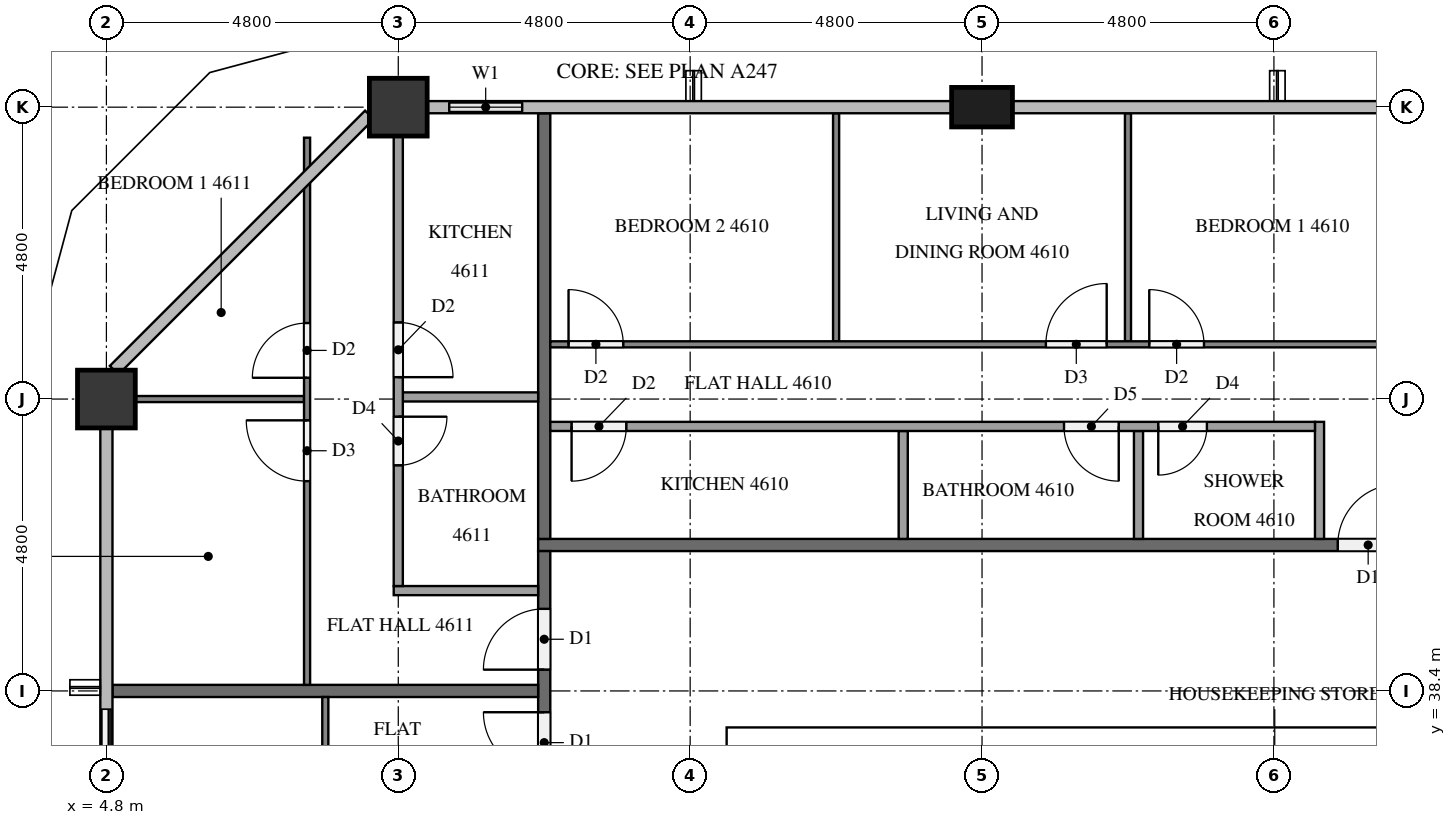
"""IFC4 building model, lengths in metres.
Left out: names, types, materials, properties, quantities, classifications, styles, units other than length and angle.
Written with IfcOpenShell. Run it as: python <this file> out.ifc"""

import sys

from ifc_helpers import new_model, si_unit, direction, frame, frame_2d, origin, origin_2d, place, context, subcontext, project, spatial, rectangle, extrude, element, fill, save


model = new_model("IFC4")
c1 = context("Model", 3, precision=1e-05, world=origin(), true_north=direction((0.0, 1.0)))
c2 = subcontext(c1, "Body", "Model", "MODEL_VIEW")
j1 = project(units=[si_unit("LENGTHUNIT", "METRE"), si_unit("PLANEANGLEUNIT", "RADIAN")], contexts=[c1])
p1 = place(None, origin())
s1 = spatial("IfcSite", under=j1, at=p1, CompositionType="ELEMENT")
p2 = place(p1, origin())
s2 = spatial("IfcBuilding", under=s1, at=p2, CompositionType="ELEMENT")
p3 = place(p2, frame((0.0, 0.0, 178.9)))
s3 = spatial("IfcBuildingStorey", under=s2, at=p3, CompositionType="ELEMENT", Elevation=178.9)
p4 = place(p3, frame((15.0, 37.45, 0.0), z_axis=(0.0, 0.0, 1.0), x_axis=(1.0, 0.0, 0.0)))
e1 = element("IfcWall", 1, at=p4, inside=s3, PredefinedType="SHEAR", context=c2, shape_type="SweptSolid", body=[
    extrude(rectangle(XDim=32.4, YDim=0.7, at=frame_2d((16.2, 0.0))), origin(), (0.0, 0.0, 1.0), 3.2),
])
p5 = place(p4, frame((15.3, 0.0, 0.0)))
e2 = element("IfcOpeningElement", 2, at=p5, cuts=e1, PredefinedType="OPENING", context=c2, shape_type="SweptSolid", body=[
    extrude(rectangle(XDim=1.8, YDim=2.1, at=frame_2d((0.9, 1.05))), frame((0.0, 0.36, 0.0), z_axis=(0.0, -1.0, 0.0), x_axis=(1.0, 0.0, 0.0)), (0.0, 0.0, 1.0), 0.72),
])
p6 = place(p4, frame((1.544, 0.0, 0.0)))
e3 = element("IfcOpeningElement", 3, at=p6, cuts=e1, PredefinedType="OPENING", context=c2, shape_type="SweptSolid", body=[
    extrude(rectangle(XDim=1.0, YDim=2.1, at=frame_2d((0.5, 1.05))), frame((0.0, 0.36, 0.0), z_axis=(0.0, -1.0, 0.0), x_axis=(1.0, 0.0, 0.0)), (0.0, 0.0, 1.0), 0.72),
])
p7 = place(p4, frame((5.219, 0.0, 0.0)))
e4 = element("IfcOpeningElement", 4, at=p7, cuts=e1, PredefinedType="OPENING", context=c2, shape_type="SweptSolid", body=[
    extrude(rectangle(XDim=1.0, YDim=2.1, at=frame_2d((0.5, 1.05))), frame((0.0, 0.36, 0.0), z_axis=(0.0, -1.0, 0.0), x_axis=(1.0, 0.0, 0.0)), (0.0, 0.0, 1.0), 0.72),
])
p8 = place(p3, frame((19.2, 48.0, 0.0), z_axis=(0.0, 0.0, 1.0), x_axis=(1.0, 0.0, 0.0)))
e5 = element("IfcColumn", 5, at=p8, inside=s3, PredefinedType="COLUMN", context=c2, shape_type="SweptSolid", body=[
    extrude(rectangle(XDim=1.0, YDim=0.65, at=origin_2d()), origin(), (0.0, 0.0, 1.0), 3.2),
])
for number, where, z_axis, x_axis in (
    (6, (9.6, 48.0, 0.0), (0.0, 0.0, 1.0), (1.0, 0.0, 0.0)),
    (7, (4.8, 43.2, 0.0), (0.0, 0.0, 1.0), (1.0, 0.0, 0.0)),
):
    element("IfcColumn", number, at=place(p3, frame(where, z_axis=z_axis, x_axis=x_axis)), inside=s3, PredefinedType="COLUMN", context=c2, shape_type="SweptSolid", body=[
        extrude(rectangle(XDim=0.95, YDim=0.95, at=origin_2d()), origin(), (0.0, 0.0, 1.0), 3.2),
    ])
p9 = place(p3, frame((12.0, 48.0, 0.0), z_axis=(0.0, 0.0, 1.0), x_axis=(-1.0, 0.0, 0.0)))
e8 = element("IfcWall", 8, at=p9, inside=s3, PredefinedType="SOLIDWALL", context=c2, shape_type="SweptSolid", body=[
    extrude(rectangle(XDim=1.925, YDim=0.15, at=frame_2d((0.962, 0.0))), origin(), (0.0, 0.0, 1.0), 3.2),
])
p10 = place(p9, frame((0.363, 0.0, 0.9)))
e9 = element("IfcOpeningElement", 9, at=p10, cuts=e8, PredefinedType="OPENING", context=c2, shape_type="SweptSolid", body=[
    extrude(rectangle(XDim=1.2, YDim=1.4, at=frame_2d((0.6, 0.7))), frame((0.0, 0.085, 0.0), z_axis=(0.0, -1.0, 0.0), x_axis=(1.0, 0.0, 0.0)), (0.0, 0.0, 1.0), 0.17),
])
p11 = place(p3, frame((4.8, 38.4, 0.0), z_axis=(0.0, 0.0, 1.0), x_axis=(0.0, -1.0, 0.0)))
e10 = element("IfcWall", 10, at=p11, inside=s3, PredefinedType="SOLIDWALL", context=c2, shape_type="SweptSolid", body=[
    extrude(rectangle(XDim=2.4, YDim=0.15, at=frame_2d((1.2, 0.0))), origin(), (0.0, 0.0, 1.0), 3.2),
])
p12 = place(p11, frame((0.3, 0.0, 0.0)))
e11 = element("IfcOpeningElement", 11, at=p12, cuts=e10, PredefinedType="OPENING", context=c2, shape_type="SweptSolid", body=[
    extrude(rectangle(XDim=1.8, YDim=2.4, at=frame_2d((0.9, 1.2))), frame((0.0, 0.085, 0.0), z_axis=(0.0, -1.0, 0.0), x_axis=(1.0, 0.0, 0.0)), (0.0, 0.0, 1.0), 0.17),
])
p13 = place(p3, frame((11.9, 40.8, 0.0), z_axis=(0.0, 0.0, 1.0), x_axis=(1.0, 0.0, 0.0)))
e12 = element("IfcWall", 12, at=p13, inside=s3, PredefinedType="PARTITIONING", context=c2, shape_type="SweptSolid", body=[
    extrude(rectangle(XDim=38.6, YDim=0.2, at=frame_2d((19.3, 0.0))), origin(), (0.0, 0.0, 1.0), 3.2),
])
p14 = place(p13, frame((37.15, 0.0, 0.0)))
e13 = element("IfcOpeningElement", 13, at=p14, cuts=e12, PredefinedType="OPENING", context=c2, shape_type="SweptSolid", body=[
    extrude(rectangle(XDim=1.0, YDim=2.1, at=frame_2d((0.5, 1.05))), frame((0.0, 0.11, 0.0), z_axis=(0.0, -1.0, 0.0), x_axis=(1.0, 0.0, 0.0)), (0.0, 0.0, 1.0), 0.22),
])
p15 = place(p13, frame((20.35, 0.0, 0.0)))
e14 = element("IfcOpeningElement", 14, at=p15, cuts=e12, PredefinedType="OPENING", context=c2, shape_type="SweptSolid", body=[
    extrude(rectangle(XDim=1.0, YDim=2.1, at=frame_2d((0.5, 1.05))), frame((0.0, 0.11, 0.0), z_axis=(0.0, -1.0, 0.0), x_axis=(1.0, 0.0, 0.0)), (0.0, 0.0, 1.0), 0.22),
])
p16 = place(p13, frame((13.15, 0.0, 0.0)))
e15 = element("IfcOpeningElement", 15, at=p16, cuts=e12, PredefinedType="OPENING", context=c2, shape_type="SweptSolid", body=[
    extrude(rectangle(XDim=1.0, YDim=2.1, at=frame_2d((0.5, 1.05))), frame((0.0, 0.11, 0.0), z_axis=(0.0, -1.0, 0.0), x_axis=(1.0, 0.0, 0.0)), (0.0, 0.0, 1.0), 0.22),
])
p17 = place(p3, frame((12.0, 12.1, 0.0), z_axis=(0.0, 0.0, 1.0), x_axis=(0.0, 1.0, 0.0)))
e16 = element("IfcWall", 16, at=p17, inside=s3, PredefinedType="PARTITIONING", context=c2, shape_type="SweptSolid", body=[
    extrude(rectangle(XDim=28.6, YDim=0.2, at=frame_2d((14.3, 0.0))), origin(), (0.0, 0.0, 1.0), 3.2),
])
p18 = place(p17, frame((26.65, 0.0, 0.0)))
e17 = element("IfcOpeningElement", 17, at=p18, cuts=e16, PredefinedType="OPENING", context=c2, shape_type="SweptSolid", body=[
    extrude(rectangle(XDim=1.0, YDim=2.1, at=frame_2d((0.5, 1.05))), frame((0.0, 0.11, 0.0), z_axis=(0.0, -1.0, 0.0), x_axis=(1.0, 0.0, 0.0)), (0.0, 0.0, 1.0), 0.22),
])
p19 = place(p17, frame((24.95, 0.0, 0.0)))
e18 = element("IfcOpeningElement", 18, at=p19, cuts=e16, PredefinedType="OPENING", context=c2, shape_type="SweptSolid", body=[
    extrude(rectangle(XDim=1.0, YDim=2.1, at=frame_2d((0.5, 1.05))), frame((0.0, 0.11, 0.0), z_axis=(0.0, -1.0, 0.0), x_axis=(1.0, 0.0, 0.0)), (0.0, 0.0, 1.0), 0.22),
])
p20 = place(p17, frame((12.95, 0.0, 0.0)))
e19 = element("IfcOpeningElement", 19, at=p20, cuts=e16, PredefinedType="OPENING", context=c2, shape_type="SweptSolid", body=[
    extrude(rectangle(XDim=1.0, YDim=2.1, at=frame_2d((0.5, 1.05))), frame((0.0, 0.11, 0.0), z_axis=(0.0, -1.0, 0.0), x_axis=(1.0, 0.0, 0.0)), (0.0, 0.0, 1.0), 0.22),
])
for number, where, z_axis, x_axis in (
    (20, (12.0, 47.9, 0.0), (0.0, 0.0, 1.0), (0.0, -1.0, 0.0)),
    (21, (4.9, 38.4, 0.0), (0.0, 0.0, 1.0), (1.0, 0.0, 0.0)),
):
    element("IfcWall", number, at=place(p3, frame(where, z_axis=z_axis, x_axis=x_axis)), inside=s3, PredefinedType="PARTITIONING", context=c2, shape_type="SweptSolid", body=[
        extrude(rectangle(XDim=7.0, YDim=0.2, at=frame_2d((3.5, 0.0))), origin(), (0.0, 0.0, 1.0), 3.2),
    ])
for number, where, z_axis, x_axis in (
    (22, (21.6, 44.15, 0.0), (0.0, 0.0, 1.0), (0.0, 1.0, 0.0)),
    (23, (16.8, 44.15, 0.0), (0.0, 0.0, 1.0), (0.0, 1.0, 0.0)),
):
    element("IfcWall", number, at=place(p3, frame(where, z_axis=z_axis, x_axis=x_axis)), inside=s3, PredefinedType="PARTITIONING", context=c2, shape_type="SweptSolid", body=[
        extrude(rectangle(XDim=3.75, YDim=0.1, at=frame_2d((1.875, 0.0))), origin(), (0.0, 0.0, 1.0), 3.2),
    ])
p21 = place(p3, frame((12.1, 44.1, 0.0), z_axis=(0.0, 0.0, 1.0), x_axis=(1.0, 0.0, 0.0)))
e24 = element("IfcWall", 24, at=p21, inside=s3, PredefinedType="PARTITIONING", context=c2, shape_type="SweptSolid", body=[
    extrude(rectangle(XDim=14.2, YDim=0.1, at=frame_2d((7.1, 0.0))), origin(), (0.0, 0.0, 1.0), 3.2),
])
p22 = place(p21, frame((9.85, 0.0, 0.0)))
e25 = element("IfcOpeningElement", 25, at=p22, cuts=e24, PredefinedType="OPENING", context=c2, shape_type="SweptSolid", body=[
    extrude(rectangle(XDim=0.9, YDim=2.1, at=frame_2d((0.45, 1.05))), frame((0.0, 0.06, 0.0), z_axis=(0.0, -1.0, 0.0), x_axis=(1.0, 0.0, 0.0)), (0.0, 0.0, 1.0), 0.12),
])
p23 = place(p21, frame((8.15, 0.0, 0.0)))
e26 = element("IfcOpeningElement", 26, at=p23, cuts=e24, PredefinedType="OPENING", context=c2, shape_type="SweptSolid", body=[
    extrude(rectangle(XDim=1.0, YDim=2.1, at=frame_2d((0.5, 1.05))), frame((0.0, 0.06, 0.0), z_axis=(0.0, -1.0, 0.0), x_axis=(1.0, 0.0, 0.0)), (0.0, 0.0, 1.0), 0.12),
])
p24 = place(p21, frame((0.3, 0.0, 0.0)))
e27 = element("IfcOpeningElement", 27, at=p24, cuts=e24, PredefinedType="OPENING", context=c2, shape_type="SweptSolid", body=[
    extrude(rectangle(XDim=0.9, YDim=2.1, at=frame_2d((0.45, 1.05))), frame((0.0, 0.06, 0.0), z_axis=(0.0, -1.0, 0.0), x_axis=(1.0, 0.0, 0.0)), (0.0, 0.0, 1.0), 0.12),
])
for number, where, z_axis, x_axis in (
    (28, (21.773, 40.9, 0.0), (0.0, 0.0, 1.0), (0.0, 1.0, 0.0)),
    (29, (17.904, 40.9, 0.0), (0.0, 0.0, 1.0), (0.0, 1.0, 0.0)),
):
    element("IfcWall", number, at=place(p3, frame(where, z_axis=z_axis, x_axis=x_axis)), inside=s3, PredefinedType="PARTITIONING", context=c2, shape_type="SweptSolid", body=[
        extrude(rectangle(XDim=1.775, YDim=0.15, at=frame_2d((0.888, 0.0))), origin(), (0.0, 0.0, 1.0), 3.2),
    ])
p25 = place(p3, frame((24.75, 40.9, 0.0), z_axis=(0.0, 0.0, 1.0), x_axis=(0.0, 1.0, 0.0)))
e30 = element("IfcWall", 30, at=p25, inside=s3, PredefinedType="PARTITIONING", context=c2, shape_type="SweptSolid", body=[
    extrude(rectangle(XDim=1.925, YDim=0.15, at=frame_2d((0.962, 0.0))), origin(), (0.0, 0.0, 1.0), 3.2),
])
p26 = place(p3, frame((24.675, 42.75, 0.0), z_axis=(0.0, 0.0, 1.0), x_axis=(-1.0, 0.0, 0.0)))
e31 = element("IfcWall", 31, at=p26, inside=s3, PredefinedType="PARTITIONING", context=c2, shape_type="SweptSolid", body=[
    extrude(rectangle(XDim=12.575, YDim=0.15, at=frame_2d((6.288, 0.0))), origin(), (0.0, 0.0, 1.0), 3.2),
])
p27 = place(p26, frame((1.777, 0.0, 0.0)))
e32 = element("IfcOpeningElement", 32, at=p27, cuts=e31, PredefinedType="OPENING", context=c2, shape_type="SweptSolid", body=[
    extrude(rectangle(XDim=0.8, YDim=2.1, at=frame_2d((0.4, 1.05))), frame((0.0, 0.085, 0.0), z_axis=(0.0, -1.0, 0.0), x_axis=(1.0, 0.0, 0.0)), (0.0, 0.0, 1.0), 0.17),
])
p28 = place(p26, frame((3.227, 0.0, 0.0)))
e33 = element("IfcOpeningElement", 33, at=p28, cuts=e31, PredefinedType="OPENING", context=c2, shape_type="SweptSolid", body=[
    extrude(rectangle(XDim=0.9, YDim=2.1, at=frame_2d((0.45, 1.05))), frame((0.0, 0.085, 0.0), z_axis=(0.0, -1.0, 0.0), x_axis=(1.0, 0.0, 0.0)), (0.0, 0.0, 1.0), 0.17),
])
p29 = place(p26, frame((11.325, 0.0, 0.0)))
e34 = element("IfcOpeningElement", 34, at=p29, cuts=e31, PredefinedType="OPENING", context=c2, shape_type="SweptSolid", body=[
    extrude(rectangle(XDim=0.9, YDim=2.1, at=frame_2d((0.45, 1.05))), frame((0.0, 0.085, 0.0), z_axis=(0.0, -1.0, 0.0), x_axis=(1.0, 0.0, 0.0)), (0.0, 0.0, 1.0), 0.17),
])
p30 = place(p3, frame((8.05, 43.2, 0.0), z_axis=(0.0, 0.0, 1.0), x_axis=(-1.0, 0.0, 0.0)))
e35 = element("IfcWall", 35, at=p30, inside=s3, PredefinedType="PARTITIONING", context=c2, shape_type="SweptSolid", body=[
    extrude(rectangle(XDim=2.775, YDim=0.1, at=frame_2d((1.388, 0.0))), origin(), (0.0, 0.0, 1.0), 3.2),
])
p31 = place(p3, frame((8.1, 38.5, 0.0), z_axis=(0.0, 0.0, 1.0), x_axis=(0.0, 1.0, 0.0)))
e36 = element("IfcWall", 36, at=p31, inside=s3, PredefinedType="PARTITIONING", context=c2, shape_type="SweptSolid", body=[
    extrude(rectangle(XDim=8.998, YDim=0.1, at=frame_2d((4.499, 0.0))), origin(), (0.0, 0.0, 1.0), 3.2),
])
p32 = place(p31, frame((3.35, 0.0, 0.0)))
e37 = element("IfcOpeningElement", 37, at=p32, cuts=e36, PredefinedType="OPENING", context=c2, shape_type="SweptSolid", body=[
    extrude(rectangle(XDim=1.0, YDim=2.1, at=frame_2d((0.5, 1.05))), frame((0.0, 0.06, 0.0), z_axis=(0.0, -1.0, 0.0), x_axis=(1.0, 0.0, 0.0)), (0.0, 0.0, 1.0), 0.12),
])
p33 = place(p31, frame((5.05, 0.0, 0.0)))
e38 = element("IfcOpeningElement", 38, at=p33, cuts=e36, PredefinedType="OPENING", context=c2, shape_type="SweptSolid", body=[
    extrude(rectangle(XDim=0.9, YDim=2.1, at=frame_2d((0.45, 1.05))), frame((0.0, 0.06, 0.0), z_axis=(0.0, -1.0, 0.0), x_axis=(1.0, 0.0, 0.0)), (0.0, 0.0, 1.0), 0.12),
])
p34 = place(p3, frame((11.9, 43.235, 0.0), z_axis=(0.0, 0.0, 1.0), x_axis=(-1.0, 0.0, 0.0)))
e39 = element("IfcWall", 39, at=p34, inside=s3, PredefinedType="PARTITIONING", context=c2, shape_type="SweptSolid", body=[
    extrude(rectangle(XDim=2.225, YDim=0.15, at=frame_2d((1.112, 0.0))), origin(), (0.0, 0.0, 1.0), 3.2),
])
p35 = place(p3, frame((11.9, 40.05, 0.0), z_axis=(0.0, 0.0, 1.0), x_axis=(-1.0, 0.0, 0.0)))
e40 = element("IfcWall", 40, at=p35, inside=s3, PredefinedType="PARTITIONING", context=c2, shape_type="SweptSolid", body=[
    extrude(rectangle(XDim=2.375, YDim=0.15, at=frame_2d((1.188, 0.0))), origin(), (0.0, 0.0, 1.0), 3.2),
])
p36 = place(p3, frame((9.6, 47.525, 0.0), z_axis=(0.0, 0.0, 1.0), x_axis=(0.0, -1.0, 0.0)))
e41 = element("IfcWall", 41, at=p36, inside=s3, PredefinedType="PARTITIONING", context=c2, shape_type="SweptSolid", body=[
    extrude(rectangle(XDim=7.4, YDim=0.15, at=frame_2d((3.7, 0.0))), origin(), (0.0, 0.0, 1.0), 3.2),
])
p37 = place(p36, frame((4.615, 0.0, 0.0)))
e42 = element("IfcOpeningElement", 42, at=p37, cuts=e41, PredefinedType="OPENING", context=c2, shape_type="SweptSolid", body=[
    extrude(rectangle(XDim=0.8, YDim=2.1, at=frame_2d((0.4, 1.05))), frame((0.0, 0.085, 0.0), z_axis=(0.0, -1.0, 0.0), x_axis=(1.0, 0.0, 0.0)), (0.0, 0.0, 1.0), 0.17),
])
p38 = place(p36, frame((3.065, 0.0, 0.0)))
e43 = element("IfcOpeningElement", 43, at=p38, cuts=e41, PredefinedType="OPENING", context=c2, shape_type="SweptSolid", body=[
    extrude(rectangle(XDim=0.9, YDim=2.1, at=frame_2d((0.45, 1.05))), frame((0.0, 0.085, 0.0), z_axis=(0.0, -1.0, 0.0), x_axis=(1.0, 0.0, 0.0)), (0.0, 0.0, 1.0), 0.17),
])
p39 = place(p3, frame((8.4, 26.5, 0.0), z_axis=(0.0, 0.0, 1.0), x_axis=(0.0, 1.0, 0.0)))
e44 = element("IfcWall", 44, at=p39, inside=s3, PredefinedType="PARTITIONING", context=c2, shape_type="SweptSolid", body=[
    extrude(rectangle(XDim=11.8, YDim=0.1, at=frame_2d((5.9, 0.0))), origin(), (0.0, 0.0, 1.0), 3.2),
])
p40 = place(p39, frame((5.05, 0.0, 0.0)))
e45 = element("IfcOpeningElement", 45, at=p40, cuts=e44, PredefinedType="OPENING", context=c2, shape_type="SweptSolid", body=[
    extrude(rectangle(XDim=1.0, YDim=2.1, at=frame_2d((0.5, 1.05))), frame((0.0, 0.06, 0.0), z_axis=(0.0, -1.0, 0.0), x_axis=(1.0, 0.0, 0.0)), (0.0, 0.0, 1.0), 0.12),
])
p41 = place(p39, frame((3.45, 0.0, 0.0)))
e46 = element("IfcOpeningElement", 46, at=p41, cuts=e44, PredefinedType="OPENING", context=c2, shape_type="SweptSolid", body=[
    extrude(rectangle(XDim=0.9, YDim=2.1, at=frame_2d((0.45, 1.05))), frame((0.0, 0.06, 0.0), z_axis=(0.0, -1.0, 0.0), x_axis=(1.0, 0.0, 0.0)), (0.0, 0.0, 1.0), 0.12),
])
p42 = place(p10, origin())
e47 = element("IfcWindow", 47, at=p42, inside=s3, PartitioningType="SINGLE_PANEL", PredefinedType="WINDOW", context=c2, shape_type="SweptSolid", body=[
    extrude(rectangle(XDim=1.2, YDim=1.4, at=frame_2d((0.6, 0.7))), frame((0.0, 0.03, 0.0), z_axis=(0.0, -1.0, 0.0), x_axis=(1.0, 0.0, 0.0)), (0.0, 0.0, 1.0), 0.06),
])
fill(e9, e47)
p43 = place(p12, origin())
e48 = element("IfcDoor", 48, at=p43, inside=s3, OperationType="SLIDING_TO_RIGHT", PredefinedType="DOOR", context=c2, shape_type="SweptSolid", body=[
    extrude(rectangle(XDim=1.8, YDim=2.4, at=frame_2d((0.9, 1.2))), frame((0.0, 0.025, 0.0), z_axis=(0.0, -1.0, 0.0), x_axis=(1.0, 0.0, 0.0)), (0.0, 0.0, 1.0), 0.05),
])
fill(e11, e48)
p44 = place(p16, origin())
e49 = element("IfcDoor", 49, at=p44, inside=s3, OperationType="SINGLE_SWING_RIGHT", PredefinedType="DOOR", context=c2, shape_type="SweptSolid", body=[
    extrude(rectangle(XDim=1.0, YDim=2.1, at=frame_2d((0.5, 1.05))), frame((0.0, 0.025, 0.0), z_axis=(0.0, -1.0, 0.0), x_axis=(1.0, 0.0, 0.0)), (0.0, 0.0, 1.0), 0.05),
])
fill(e15, e49)
p45 = place(p18, origin())
e50 = element("IfcDoor", 50, at=p45, inside=s3, OperationType="SINGLE_SWING_LEFT", PredefinedType="DOOR", context=c2, shape_type="SweptSolid", body=[
    extrude(rectangle(XDim=1.0, YDim=2.1, at=frame_2d((0.5, 1.05))), frame((0.0, 0.025, 0.0), z_axis=(0.0, -1.0, 0.0), x_axis=(1.0, 0.0, 0.0)), (0.0, 0.0, 1.0), 0.05),
])
fill(e17, e50)
p46 = place(p19, origin())
e51 = element("IfcDoor", 51, at=p46, inside=s3, OperationType="SINGLE_SWING_RIGHT", PredefinedType="DOOR", context=c2, shape_type="SweptSolid", body=[
    extrude(rectangle(XDim=1.0, YDim=2.1, at=frame_2d((0.5, 1.05))), frame((0.0, 0.025, 0.0), z_axis=(0.0, -1.0, 0.0), x_axis=(1.0, 0.0, 0.0)), (0.0, 0.0, 1.0), 0.05),
])
fill(e18, e51)
p47 = place(p22, origin())
e52 = element("IfcDoor", 52, at=p47, inside=s3, OperationType="SINGLE_SWING_LEFT", PredefinedType="DOOR", context=c2, shape_type="SweptSolid", body=[
    extrude(rectangle(XDim=0.9, YDim=2.1, at=frame_2d((0.45, 1.05))), frame((0.0, 0.025, 0.0), z_axis=(0.0, -1.0, 0.0), x_axis=(1.0, 0.0, 0.0)), (0.0, 0.0, 1.0), 0.05),
])
fill(e25, e52)
p48 = place(p23, origin())
e53 = element("IfcDoor", 53, at=p48, inside=s3, OperationType="SINGLE_SWING_RIGHT", PredefinedType="DOOR", context=c2, shape_type="SweptSolid", body=[
    extrude(rectangle(XDim=1.0, YDim=2.1, at=frame_2d((0.5, 1.05))), frame((0.0, 0.025, 0.0), z_axis=(0.0, -1.0, 0.0), x_axis=(1.0, 0.0, 0.0)), (0.0, 0.0, 1.0), 0.05),
])
fill(e26, e53)
p49 = place(p24, origin())
e54 = element("IfcDoor", 54, at=p49, inside=s3, OperationType="SINGLE_SWING_LEFT", PredefinedType="DOOR", context=c2, shape_type="SweptSolid", body=[
    extrude(rectangle(XDim=0.9, YDim=2.1, at=frame_2d((0.45, 1.05))), frame((0.0, 0.025, 0.0), z_axis=(0.0, -1.0, 0.0), x_axis=(1.0, 0.0, 0.0)), (0.0, 0.0, 1.0), 0.05),
])
fill(e27, e54)
p50 = place(p27, origin())
e55 = element("IfcDoor", 55, at=p50, inside=s3, OperationType="SINGLE_SWING_RIGHT", PredefinedType="DOOR", context=c2, shape_type="SweptSolid", body=[
    extrude(rectangle(XDim=0.8, YDim=2.1, at=frame_2d((0.4, 1.05))), frame((0.0, 0.025, 0.0), z_axis=(0.0, -1.0, 0.0), x_axis=(1.0, 0.0, 0.0)), (0.0, 0.0, 1.0), 0.05),
])
fill(e32, e55)
p51 = place(p28, origin())
e56 = element("IfcDoor", 56, at=p51, inside=s3, OperationType="SINGLE_SWING_LEFT", PredefinedType="DOOR", context=c2, shape_type="SweptSolid", body=[
    extrude(rectangle(XDim=0.9, YDim=2.1, at=frame_2d((0.45, 1.05))), frame((0.0, 0.025, 0.0), z_axis=(0.0, -1.0, 0.0), x_axis=(1.0, 0.0, 0.0)), (0.0, 0.0, 1.0), 0.05),
])
fill(e33, e56)
p52 = place(p29, origin())
e57 = element("IfcDoor", 57, at=p52, inside=s3, OperationType="SINGLE_SWING_RIGHT", PredefinedType="DOOR", context=c2, shape_type="SweptSolid", body=[
    extrude(rectangle(XDim=0.9, YDim=2.1, at=frame_2d((0.45, 1.05))), frame((0.0, 0.025, 0.0), z_axis=(0.0, -1.0, 0.0), x_axis=(1.0, 0.0, 0.0)), (0.0, 0.0, 1.0), 0.05),
])
fill(e34, e57)
p53 = place(p32, origin())
e58 = element("IfcDoor", 58, at=p53, inside=s3, OperationType="SINGLE_SWING_RIGHT", PredefinedType="DOOR", context=c2, shape_type="SweptSolid", body=[
    extrude(rectangle(XDim=1.0, YDim=2.1, at=frame_2d((0.5, 1.05))), frame((0.0, 0.025, 0.0), z_axis=(0.0, -1.0, 0.0), x_axis=(1.0, 0.0, 0.0)), (0.0, 0.0, 1.0), 0.05),
])
fill(e37, e58)
p54 = place(p33, origin())
e59 = element("IfcDoor", 59, at=p54, inside=s3, OperationType="SINGLE_SWING_LEFT", PredefinedType="DOOR", context=c2, shape_type="SweptSolid", body=[
    extrude(rectangle(XDim=0.9, YDim=2.1, at=frame_2d((0.45, 1.05))), frame((0.0, 0.025, 0.0), z_axis=(0.0, -1.0, 0.0), x_axis=(1.0, 0.0, 0.0)), (0.0, 0.0, 1.0), 0.05),
])
fill(e38, e59)
p55 = place(p37, origin())
e60 = element("IfcDoor", 60, at=p55, inside=s3, OperationType="SINGLE_SWING_LEFT", PredefinedType="DOOR", context=c2, shape_type="SweptSolid", body=[
    extrude(rectangle(XDim=0.8, YDim=2.1, at=frame_2d((0.4, 1.05))), frame((0.0, 0.025, 0.0), z_axis=(0.0, -1.0, 0.0), x_axis=(1.0, 0.0, 0.0)), (0.0, 0.0, 1.0), 0.05),
])
fill(e42, e60)
p56 = place(p38, origin())
e61 = element("IfcDoor", 61, at=p56, inside=s3, OperationType="SINGLE_SWING_RIGHT", PredefinedType="DOOR", context=c2, shape_type="SweptSolid", body=[
    extrude(rectangle(XDim=0.9, YDim=2.1, at=frame_2d((0.45, 1.05))), frame((0.0, 0.025, 0.0), z_axis=(0.0, -1.0, 0.0), x_axis=(1.0, 0.0, 0.0)), (0.0, 0.0, 1.0), 0.05),
])
fill(e43, e61)
save(model, sys.argv[1])
